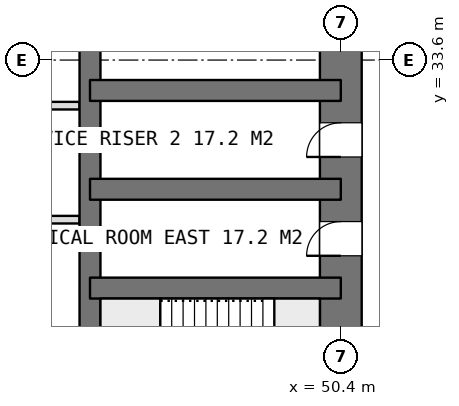
"""IFC4 building model, lengths in metres.
Left out: names, types, materials, properties, quantities, classifications, styles, units other than length and angle.
Written with IfcOpenShell. Run it as: python <this file> out.ifc"""

import sys

from ifc_helpers import new_model, si_unit, direction, frame, frame_2d, origin, place, context, subcontext, project, spatial, rectangle, extrude, element, fill, save


model = new_model("IFC4")
c1 = context("Model", 3, precision=1e-05, world=origin(), true_north=direction((0.0, 1.0)))
c2 = subcontext(c1, "Body", "Model", "MODEL_VIEW")
j1 = project(units=[si_unit("LENGTHUNIT", "METRE"), si_unit("PLANEANGLEUNIT", "RADIAN")], contexts=[c1])
p1 = place(None, origin())
s1 = spatial("IfcSite", under=j1, at=p1, CompositionType="ELEMENT")
p2 = place(p1, origin())
s2 = spatial("IfcBuilding", under=s1, at=p2, CompositionType="ELEMENT")
p3 = place(p2, frame((0.0, 0.0, 55.4)))
s3 = spatial("IfcBuildingStorey", under=s2, at=p3, CompositionType="ELEMENT", Elevation=55.4)
p4 = place(p3, frame((50.4, 21.0, 0.0), z_axis=(0.0, 0.0, 1.0), x_axis=(0.0, 1.0, 0.0)))
e1 = element("IfcWall", 1, at=p4, inside=s3, PredefinedType="SHEAR", context=c2, shape_type="SweptSolid", body=[
    extrude(rectangle(XDim=25.2, YDim=1.1, at=frame_2d((12.6, 0.0))), origin(), (0.0, 0.0, 1.0), 3.75),
])
p5 = place(p4, frame((16.2, 0.0, 0.0)))
e2 = element("IfcOpeningElement", 2, at=p5, cuts=e1, PredefinedType="OPENING", context=c2, shape_type="SweptSolid", body=[
    extrude(rectangle(XDim=1.2, YDim=2.1, at=frame_2d((0.6, 1.05))), frame((0.0, 0.56, 0.0), z_axis=(0.0, -1.0, 0.0), x_axis=(1.0, 0.0, 0.0)), (0.0, 0.0, 1.0), 1.12),
])
p6 = place(p4, frame((10.05, 0.0, 0.0)))
e3 = element("IfcOpeningElement", 3, at=p6, cuts=e1, PredefinedType="OPENING", context=c2, shape_type="SweptSolid", body=[
    extrude(rectangle(XDim=0.9, YDim=2.1, at=frame_2d((0.45, 1.05))), frame((0.0, 0.56, 0.0), z_axis=(0.0, -1.0, 0.0), x_axis=(1.0, 0.0, 0.0)), (0.0, 0.0, 1.0), 1.12),
])
p7 = place(p4, frame((7.45, 0.0, 0.0)))
e4 = element("IfcOpeningElement", 4, at=p7, cuts=e1, PredefinedType="OPENING", context=c2, shape_type="SweptSolid", body=[
    extrude(rectangle(XDim=0.9, YDim=2.1, at=frame_2d((0.45, 1.05))), frame((0.0, 0.56, 0.0), z_axis=(0.0, -1.0, 0.0), x_axis=(1.0, 0.0, 0.0)), (0.0, 0.0, 1.0), 1.12),
])
p8 = place(p4, frame((0.75, 0.0, 0.0)))
e5 = element("IfcOpeningElement", 5, at=p8, cuts=e1, PredefinedType="OPENING", context=c2, shape_type="SweptSolid", body=[
    extrude(rectangle(XDim=1.2, YDim=2.1, at=frame_2d((0.6, 1.05))), frame((0.0, 0.56, 0.0), z_axis=(0.0, -1.0, 0.0), x_axis=(1.0, 0.0, 0.0)), (0.0, 0.0, 1.0), 1.12),
])
p9 = place(p3, frame((43.8, 21.0, 0.0), z_axis=(0.0, 0.0, 1.0), x_axis=(0.0, 1.0, 0.0)))
e6 = element("IfcWall", 6, at=p9, inside=s3, PredefinedType="SHEAR", context=c2, shape_type="SweptSolid", body=[
    extrude(rectangle(XDim=25.2, YDim=0.55, at=frame_2d((12.6, 0.0))), origin(), (0.0, 0.0, 1.0), 3.75),
])
for number, where, z_axis, x_axis in (
    (7, (43.8, 27.6, 0.0), (0.0, 0.0, 1.0), (1.0, 0.0, 0.0)),
    (8, (43.8, 30.2, 0.0), (0.0, 0.0, 1.0), (1.0, 0.0, 0.0)),
    (9, (43.8, 32.8, 0.0), (0.0, 0.0, 1.0), (1.0, 0.0, 0.0)),
):
    element("IfcWall", number, at=place(p3, frame(where, z_axis=z_axis, x_axis=x_axis)), inside=s3, PredefinedType="SHEAR", context=c2, shape_type="SweptSolid", body=[
        extrude(rectangle(XDim=6.6, YDim=0.55, at=frame_2d((3.3, 0.0))), origin(), (0.0, 0.0, 1.0), 3.75),
    ])
for number, where, z_axis, x_axis in (
    (10, (40.275, 29.4, 0.0), (0.0, 0.0, 1.0), (1.0, 0.0, 0.0)),
    (11, (40.275, 32.4, 0.0), (0.0, 0.0, 1.0), (1.0, 0.0, 0.0)),
):
    element("IfcWall", number, at=place(p3, frame(where, z_axis=z_axis, x_axis=x_axis)), inside=s3, PredefinedType="PARTITIONING", context=c2, shape_type="SweptSolid", body=[
        extrude(rectangle(XDim=3.25, YDim=0.2, at=frame_2d((1.625, 0.0))), origin(), (0.0, 0.0, 1.0), 3.5),
    ])
p10 = place(p6, origin())
e12 = element("IfcDoor", 12, at=p10, inside=s3, OperationType="SINGLE_SWING_LEFT", PredefinedType="DOOR", context=c2, shape_type="SweptSolid", body=[
    extrude(rectangle(XDim=0.9, YDim=2.1, at=frame_2d((0.45, 1.05))), frame((0.0, 0.025, 0.0), z_axis=(0.0, -1.0, 0.0), x_axis=(1.0, 0.0, 0.0)), (0.0, 0.0, 1.0), 0.05),
])
fill(e3, e12)
p11 = place(p7, origin())
e13 = element("IfcDoor", 13, at=p11, inside=s3, OperationType="SINGLE_SWING_LEFT", PredefinedType="DOOR", context=c2, shape_type="SweptSolid", body=[
    extrude(rectangle(XDim=0.9, YDim=2.1, at=frame_2d((0.45, 1.05))), frame((0.0, 0.025, 0.0), z_axis=(0.0, -1.0, 0.0), x_axis=(1.0, 0.0, 0.0)), (0.0, 0.0, 1.0), 0.05),
])
fill(e4, e13)
save(model, sys.argv[1])
